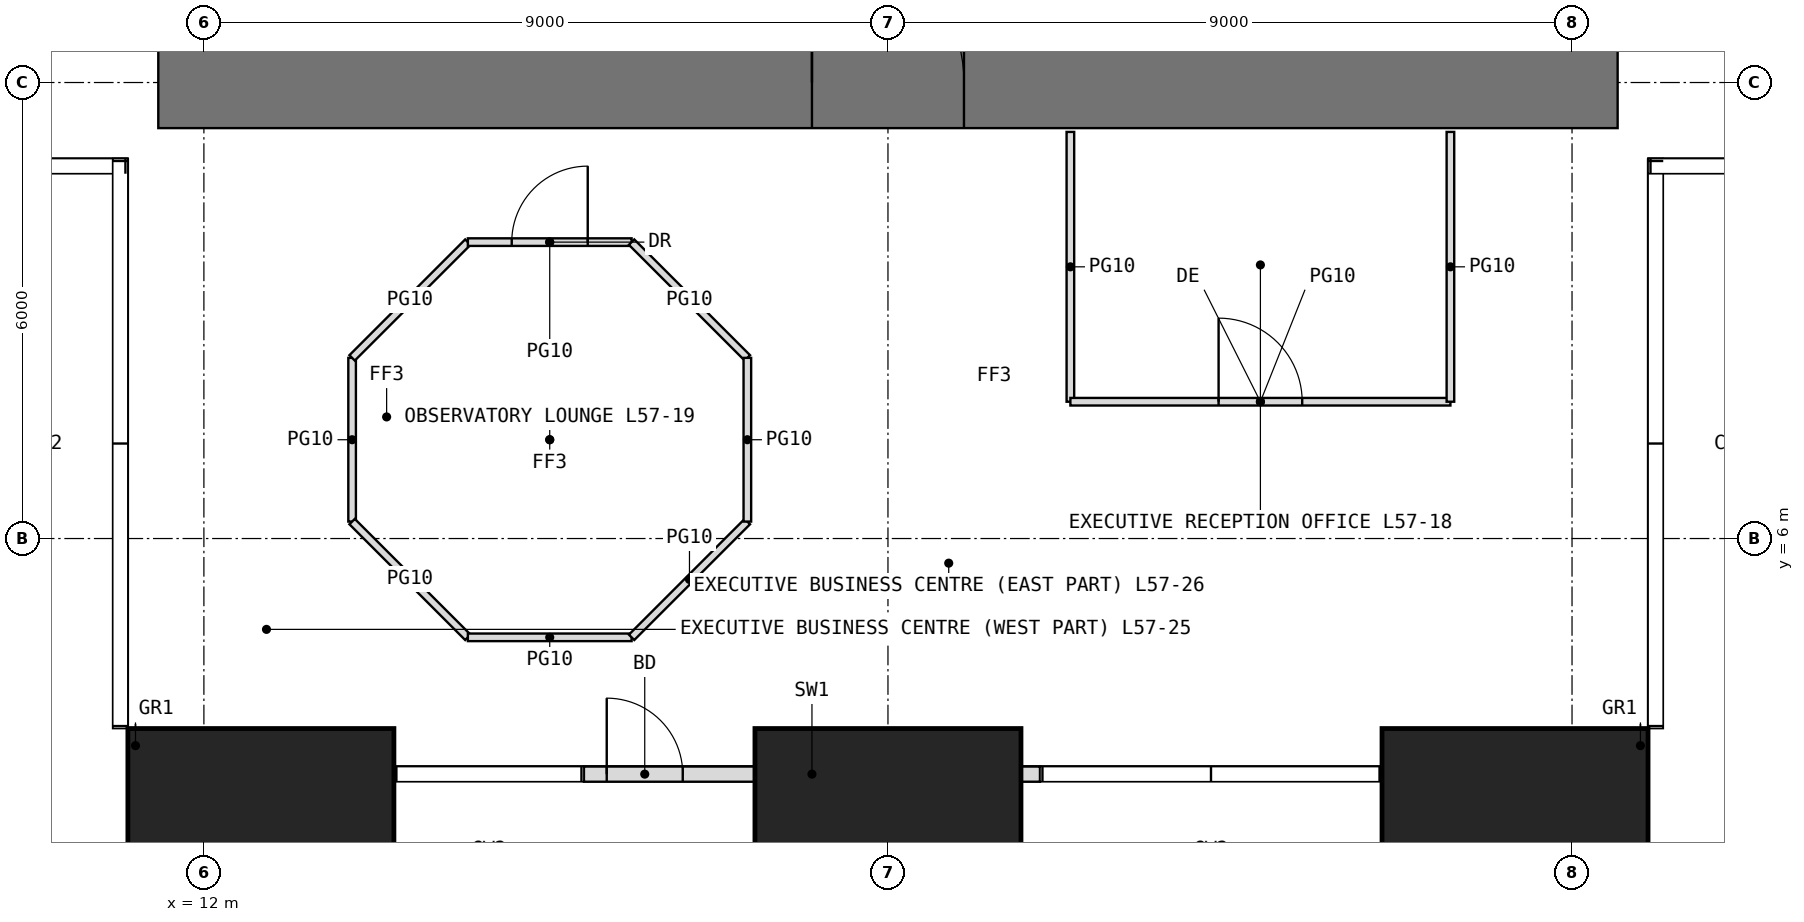
"""IFC4 building model, lengths in metres.
Left out: names, types, materials, properties, quantities, classifications, styles, units other than length and angle.
Written with IfcOpenShell. Run it as: python <this file> out.ifc"""

import sys

from ifc_helpers import new_model, si_unit, direction, frame, frame_2d, origin, origin_2d, place, context, subcontext, project, spatial, rectangle, extrude, element, fill, save


model = new_model("IFC4")
c1 = context("Model", 3, precision=1e-05, world=origin(), true_north=direction((0.0, 1.0)))
c2 = subcontext(c1, "Body", "Model", "MODEL_VIEW")
j1 = project(units=[si_unit("LENGTHUNIT", "METRE"), si_unit("PLANEANGLEUNIT", "RADIAN")], contexts=[c1])
p1 = place(None, origin())
s1 = spatial("IfcSite", under=j1, at=p1, CompositionType="ELEMENT")
p2 = place(p1, origin())
s2 = spatial("IfcBuilding", under=s1, at=p2, CompositionType="ELEMENT")
p3 = place(p2, frame((0.0, 0.0, 239.5)))
s3 = spatial("IfcBuildingStorey", under=s2, at=p3, CompositionType="ELEMENT", Elevation=239.5)
for number, where, z_axis, x_axis in (
    (1, (12.75, 1.75, 0.0), (0.0, 0.0, 1.0), (1.0, 0.0, 0.0)),
    (2, (21.0, 1.75, 0.0), (0.0, 0.0, 1.0), (1.0, 0.0, 0.0)),
    (3, (29.25, 1.75, 0.0), (0.0, 0.0, 1.0), (1.0, 0.0, 0.0)),
):
    element("IfcColumn", number, at=place(p3, frame(where, z_axis=z_axis, x_axis=x_axis)), inside=s3, PredefinedType="COLUMN", context=c2, shape_type="SweptSolid", body=[
        extrude(rectangle(XDim=3.5, YDim=3.5, at=origin_2d()), origin(), (0.0, 0.0, 1.0), 4.5),
    ])
p4 = place(p3, frame((17.0, 2.9, 0.0), z_axis=(0.0, 0.0, 1.0), x_axis=(1.0, 0.0, 0.0)))
e4 = element("IfcWall", 4, at=p4, inside=s3, PredefinedType="USERDEFINED", context=c2, shape_type="SweptSolid", body=[
    extrude(rectangle(XDim=6.0, YDim=0.2, at=frame_2d((3.0, 0.0))), origin(), (0.0, 0.0, 1.0), 4.25),
])
p5 = place(p4, frame((0.3, 0.0, 0.0)))
e5 = element("IfcOpeningElement", 5, at=p5, cuts=e4, PredefinedType="OPENING", context=c2, shape_type="SweptSolid", body=[
    extrude(rectangle(XDim=1.0, YDim=2.4, at=frame_2d((0.5, 1.2))), frame((0.0, 0.11, 0.0), z_axis=(0.0, -1.0, 0.0), x_axis=(1.0, 0.0, 0.0)), (0.0, 0.0, 1.0), 0.22),
])
p6 = place(p3, frame((11.4, 12.0, -0.05), z_axis=(0.0, 0.0, 1.0), x_axis=(1.0, 0.0, 0.0)))
e6 = element("IfcWall", 6, at=p6, inside=s3, PredefinedType="SHEAR", context=c2, shape_type="SweptSolid", body=[
    extrude(rectangle(XDim=19.2, YDim=1.2, at=frame_2d((9.6, 0.0))), origin(), (0.0, 0.0, 1.0), 4.5),
])
p7 = place(p6, frame((8.6, 0.0, 0.05)))
e7 = element("IfcOpeningElement", 7, at=p7, cuts=e6, PredefinedType="OPENING", context=c2, shape_type="SweptSolid", body=[
    extrude(rectangle(XDim=2.0, YDim=2.2, at=frame_2d((1.0, 1.1))), frame((0.0, 0.61, 0.0), z_axis=(0.0, -1.0, 0.0), x_axis=(1.0, 0.0, 0.0)), (0.0, 0.0, 1.0), 1.22),
])
p8 = place(p3, frame((13.95, 6.223, 0.0), z_axis=(0.0, 0.0, 1.0), x_axis=(0.0, 1.0, 0.0)))
e8 = element("IfcWall", 8, at=p8, inside=s3, PredefinedType="PARTITIONING", context=c2, shape_type="SweptSolid", body=[
    extrude(rectangle(XDim=2.154, YDim=0.1, at=frame_2d((1.077, 0.0))), origin(), (0.0, 0.0, 1.0), 4.25),
])
for number, where, z_axis, x_axis in (
    (9, (13.95, 6.223, 0.0), (0.0, 0.0, 1.0), (0.707, -0.707, 0.0)),
    (10, (13.95, 8.377, 0.0), (0.0, 0.0, 1.0), (0.707, 0.707, 0.0)),
):
    element("IfcWall", number, at=place(p3, frame(where, z_axis=z_axis, x_axis=x_axis)), inside=s3, PredefinedType="PARTITIONING", context=c2, shape_type="SweptSolid", body=[
        extrude(rectangle(XDim=2.154, YDim=0.1, at=frame_2d((1.077, 0.0))), origin(), (0.0, 0.0, 1.0), 4.25),
    ])
p9 = place(p3, frame((15.473, 4.7, 0.0), z_axis=(0.0, 0.0, 1.0), x_axis=(1.0, 0.0, 0.0)))
e11 = element("IfcWall", 11, at=p9, inside=s3, PredefinedType="PARTITIONING", context=c2, shape_type="SweptSolid", body=[
    extrude(rectangle(XDim=2.154, YDim=0.1, at=frame_2d((1.077, 0.0))), origin(), (0.0, 0.0, 1.0), 4.25),
])
p10 = place(p3, frame((15.473, 9.9, 0.0), z_axis=(0.0, 0.0, 1.0), x_axis=(1.0, 0.0, 0.0)))
e12 = element("IfcWall", 12, at=p10, inside=s3, PredefinedType="PARTITIONING", context=c2, shape_type="SweptSolid", body=[
    extrude(rectangle(XDim=2.154, YDim=0.1, at=frame_2d((1.077, 0.0))), origin(), (0.0, 0.0, 1.0), 4.25),
])
p11 = place(p10, frame((0.577, 0.0, 0.0)))
e13 = element("IfcOpeningElement", 13, at=p11, cuts=e12, PredefinedType="OPENING", context=c2, shape_type="SweptSolid", body=[
    extrude(rectangle(XDim=1.0, YDim=2.2, at=frame_2d((0.5, 1.1))), frame((0.0, 0.06, 0.0), z_axis=(0.0, -1.0, 0.0), x_axis=(1.0, 0.0, 0.0)), (0.0, 0.0, 1.0), 0.12),
])
for number, where, z_axis, x_axis in (
    (14, (17.627, 4.7, 0.0), (0.0, 0.0, 1.0), (0.707, 0.707, 0.0)),
    (15, (17.627, 9.9, 0.0), (0.0, 0.0, 1.0), (0.707, -0.707, 0.0)),
):
    element("IfcWall", number, at=place(p3, frame(where, z_axis=z_axis, x_axis=x_axis)), inside=s3, PredefinedType="PARTITIONING", context=c2, shape_type="SweptSolid", body=[
        extrude(rectangle(XDim=2.154, YDim=0.1, at=frame_2d((1.077, 0.0))), origin(), (0.0, 0.0, 1.0), 4.25),
    ])
p12 = place(p3, frame((19.15, 6.223, 0.0), z_axis=(0.0, 0.0, 1.0), x_axis=(0.0, 1.0, 0.0)))
e16 = element("IfcWall", 16, at=p12, inside=s3, PredefinedType="PARTITIONING", context=c2, shape_type="SweptSolid", body=[
    extrude(rectangle(XDim=2.154, YDim=0.1, at=frame_2d((1.077, 0.0))), origin(), (0.0, 0.0, 1.0), 4.25),
])
p13 = place(p3, frame((23.4, 7.8, 0.0), z_axis=(0.0, 0.0, 1.0), x_axis=(0.0, 1.0, 0.0)))
e17 = element("IfcWall", 17, at=p13, inside=s3, PredefinedType="PARTITIONING", context=c2, shape_type="SweptSolid", body=[
    extrude(rectangle(XDim=3.55, YDim=0.1, at=frame_2d((1.775, 0.0))), origin(), (0.0, 0.0, 1.0), 4.25),
])
p14 = place(p3, frame((23.4, 7.8, 0.0), z_axis=(0.0, 0.0, 1.0), x_axis=(1.0, 0.0, 0.0)))
e18 = element("IfcWall", 18, at=p14, inside=s3, PredefinedType="PARTITIONING", context=c2, shape_type="SweptSolid", body=[
    extrude(rectangle(XDim=5.0, YDim=0.1, at=frame_2d((2.5, 0.0))), origin(), (0.0, 0.0, 1.0), 4.25),
])
p15 = place(p14, frame((1.95, 0.0, 0.0)))
e19 = element("IfcOpeningElement", 19, at=p15, cuts=e18, PredefinedType="OPENING", context=c2, shape_type="SweptSolid", body=[
    extrude(rectangle(XDim=1.1, YDim=2.3, at=frame_2d((0.55, 1.15))), frame((0.0, 0.06, 0.0), z_axis=(0.0, -1.0, 0.0), x_axis=(1.0, 0.0, 0.0)), (0.0, 0.0, 1.0), 0.12),
])
p16 = place(p3, frame((28.4, 7.8, 0.0), z_axis=(0.0, 0.0, 1.0), x_axis=(0.0, 1.0, 0.0)))
e20 = element("IfcWall", 20, at=p16, inside=s3, PredefinedType="PARTITIONING", context=c2, shape_type="SweptSolid", body=[
    extrude(rectangle(XDim=3.55, YDim=0.1, at=frame_2d((1.775, 0.0))), origin(), (0.0, 0.0, 1.0), 4.25),
])
p17 = place(p5, origin())
e21 = element("IfcDoor", 21, at=p17, inside=s3, OperationType="SINGLE_SWING_LEFT", PredefinedType="DOOR", context=c2, shape_type="SweptSolid", body=[
    extrude(rectangle(XDim=1.0, YDim=2.4, at=frame_2d((0.5, 1.2))), frame((0.0, 0.025, 0.0), z_axis=(0.0, -1.0, 0.0), x_axis=(1.0, 0.0, 0.0)), (0.0, 0.0, 1.0), 0.05),
])
fill(e5, e21)
p18 = place(p7, origin())
e22 = element("IfcDoor", 22, at=p18, inside=s3, OperationType="DOUBLE_DOOR_SINGLE_SWING", PredefinedType="DOOR", context=c2, shape_type="SweptSolid", body=[
    extrude(rectangle(XDim=2.0, YDim=2.2, at=frame_2d((1.0, 1.1))), frame((0.0, 0.025, 0.0), z_axis=(0.0, -1.0, 0.0), x_axis=(1.0, 0.0, 0.0)), (0.0, 0.0, 1.0), 0.05),
])
fill(e7, e22)
p19 = place(p15, origin())
e23 = element("IfcDoor", 23, at=p19, inside=s3, OperationType="SINGLE_SWING_LEFT", PredefinedType="DOOR", context=c2, shape_type="SweptSolid", body=[
    extrude(rectangle(XDim=1.1, YDim=2.3, at=frame_2d((0.55, 1.15))), frame((0.0, 0.025, 0.0), z_axis=(0.0, -1.0, 0.0), x_axis=(1.0, 0.0, 0.0)), (0.0, 0.0, 1.0), 0.05),
])
fill(e19, e23)
p20 = place(p11, origin())
e24 = element("IfcDoor", 24, at=p20, inside=s3, OperationType="SINGLE_SWING_RIGHT", PredefinedType="DOOR", context=c2, shape_type="SweptSolid", body=[
    extrude(rectangle(XDim=1.0, YDim=2.2, at=frame_2d((0.5, 1.1))), frame((0.0, 0.025, 0.0), z_axis=(0.0, -1.0, 0.0), x_axis=(1.0, 0.0, 0.0)), (0.0, 0.0, 1.0), 0.05),
])
fill(e13, e24)
save(model, sys.argv[1])
